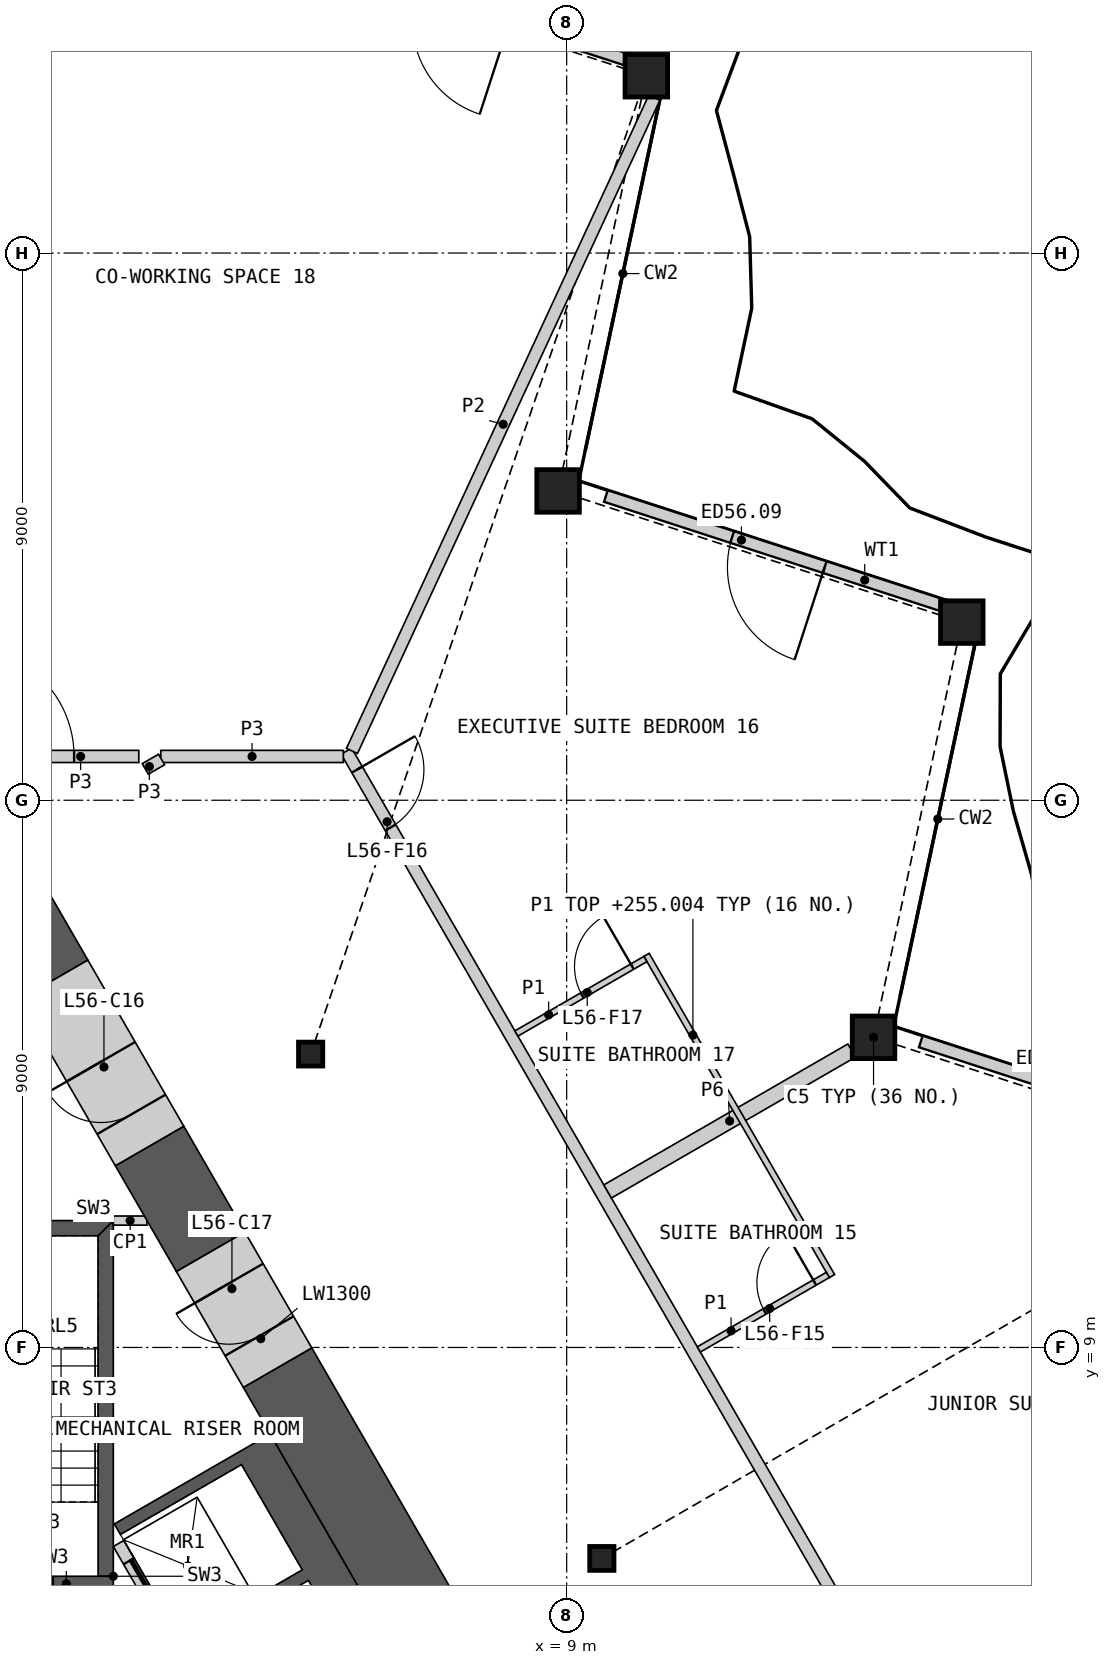
"""IFC4 building model, lengths in metres.
Left out: names, types, materials, properties, quantities, classifications, styles, units other than length and angle.
Written with IfcOpenShell. Run it as: python <this file> out.ifc"""

import sys

from ifc_helpers import new_model, si_unit, direction, frame, frame_2d, origin, origin_2d, place, context, subcontext, project, spatial, polyline, rectangle, hollow_rectangle, i_section, outline, extrude, element, fill, save


model = new_model("IFC4")
c1 = context("Model", 3, precision=1e-05, world=origin(), true_north=direction((0.0, 1.0)))
c2 = subcontext(c1, "Body", "Model", "MODEL_VIEW")
j1 = project(units=[si_unit("LENGTHUNIT", "METRE"), si_unit("PLANEANGLEUNIT", "RADIAN")], contexts=[c1])
p1 = place(None, origin())
s1 = spatial("IfcSite", under=j1, at=p1, CompositionType="ELEMENT")
p2 = place(p1, origin())
s2 = spatial("IfcBuilding", under=s1, at=p2, CompositionType="ELEMENT")
p3 = place(p2, frame((0.0, 0.0, 252.6)))
s3 = spatial("IfcBuildingStorey", under=s2, at=p3, CompositionType="ELEMENT", Elevation=252.6)
for number, where, z_axis, x_axis in (
    (1, (14.047, 14.101, 0.0), (0.0, 0.0, 1.0), (1.0, 0.0, 0.0)),
    (2, (15.499, 20.93, 0.0), (0.0, 0.0, 1.0), (1.0, 0.0, 0.0)),
    (3, (8.859, 23.087, 0.0), (0.0, 0.0, 1.0), (1.0, 0.0, 0.0)),
    (4, (10.31, 29.916, 0.0), (0.0, 0.0, 1.0), (1.0, 0.0, 0.0)),
):
    element("IfcColumn", number, at=place(p3, frame(where, z_axis=z_axis, x_axis=x_axis)), inside=s3, PredefinedType="COLUMN", context=c2, shape_type="SweptSolid", body=[
        extrude(hollow_rectangle(XDim=0.7, YDim=0.7, WallThickness=0.045, at=origin_2d()), origin(), (0.0, 0.0, 1.0), 3.6),
    ])
for number, where, z_axis, x_axis in (
    (5, (9.578, 5.53, 0.0), (0.0, 0.0, 1.0), (1.0, 0.0, 0.0)),
    (6, (4.789, 13.825, 0.0), (0.0, 0.0, 1.0), (1.0, 0.0, 0.0)),
):
    element("IfcColumn", number, at=place(p3, frame(where, z_axis=z_axis, x_axis=x_axis)), inside=s3, PredefinedType="COLUMN", context=c2, shape_type="SweptSolid", body=[
        extrude(i_section(OverallWidth=0.399, OverallDepth=0.393, WebThickness=0.023, FlangeThickness=0.037, at=origin_2d()), origin(), (0.0, 0.0, 1.0), 3.6),
    ])
p4 = place(p3, frame((20.5, 12.188, 0.0), z_axis=(0.0, 0.0, 1.0), x_axis=(-0.951053307318, 0.309026870418, 0.0)))
e7 = element("IfcWall", 7, at=p4, inside=s3, PredefinedType="SOLIDWALL", context=c2, shape_type="SweptSolid", body=[
    extrude(rectangle(XDim=5.968, YDim=0.2, at=frame_2d((2.984, 0.0))), origin(), (0.0, 0.0, 1.0), 2.701),
])
p5 = place(p4, frame((2.184, 0.0, 0.0)))
e8 = element("IfcOpeningElement", 8, at=p5, cuts=e7, PredefinedType="OPENING", context=c2, shape_type="SweptSolid", body=[
    extrude(rectangle(XDim=1.6, YDim=2.4, at=frame_2d((0.8, 1.2))), frame((0.0, 0.11, 0.0), z_axis=(0.0, -1.0, 0.0), x_axis=(1.0, 0.0, 0.0)), (0.0, 0.0, 1.0), 0.22),
])
p6 = place(p3, frame((15.321, 21.159, 0.0), z_axis=(0.0, 0.0, 1.0), x_axis=(-0.951053307318, 0.309026870418, 0.0)))
e9 = element("IfcWall", 9, at=p6, inside=s3, PredefinedType="SOLIDWALL", context=c2, shape_type="SweptSolid", body=[
    extrude(rectangle(XDim=5.968, YDim=0.2, at=frame_2d((2.984, 0.0))), origin(), (0.0, 0.0, 1.0), 2.701),
])
p7 = place(p6, frame((2.184, 0.0, 0.0)))
e10 = element("IfcOpeningElement", 10, at=p7, cuts=e9, PredefinedType="OPENING", context=c2, shape_type="SweptSolid", body=[
    extrude(rectangle(XDim=1.6, YDim=2.4, at=frame_2d((0.8, 1.2))), frame((0.0, 0.11, 0.0), z_axis=(0.0, -1.0, 0.0), x_axis=(1.0, 0.0, 0.0)), (0.0, 0.0, 1.0), 0.22),
])
p8 = place(p3, frame((10.141, 30.131, 0.0), z_axis=(0.0, 0.0, 1.0), x_axis=(-0.951049400374, 0.309038894069, 0.0)))
e11 = element("IfcWall", 11, at=p8, inside=s3, PredefinedType="SOLIDWALL", context=c2, shape_type="SweptSolid", body=[
    extrude(rectangle(XDim=5.968, YDim=0.2, at=frame_2d((2.984, 0.0))), origin(), (0.0, 0.0, 1.0), 2.701),
])
p9 = place(p8, frame((2.184, 0.0, 0.0)))
e12 = element("IfcOpeningElement", 12, at=p9, cuts=e11, PredefinedType="OPENING", context=c2, shape_type="SweptSolid", body=[
    extrude(rectangle(XDim=1.6, YDim=2.4, at=frame_2d((0.8, 1.2))), frame((0.0, 0.11, 0.0), z_axis=(0.0, -1.0, 0.0), x_axis=(1.0, 0.0, 0.0)), (0.0, 0.0, 1.0), 0.22),
])
p10 = place(p3, origin())
e13 = element("IfcWall", 13, at=p10, inside=s3, PredefinedType="SHEAR", context=c2, shape_type="SweptSolid", body=[
    extrude(outline(polyline([(7.524, 1.688), (7.131, 1.461), (4.96, 0.208), (4.861, 0.381), (6.852, 1.531), (4.752, 5.169), (2.76, 4.019), (2.66, 4.192), (4.652, 5.342), (3.652, 7.074), (1.66, 5.924), (1.561, 6.097), (3.731, 7.35), (4.124, 7.577), (7.524, 1.688)])), origin(), (0.0, 0.0, 1.0), 3.25),
])
p11 = place(p3, frame((5.817, -1.476, 0.0), z_axis=(0.0, 0.0, 1.0), x_axis=(-0.500002616675, 0.866023893041, 0.0)))
e14 = element("IfcWall", 14, at=p11, inside=s3, PredefinedType="SOLIDWALL", context=c2, shape_type="SweptSolid", body=[
    extrude(rectangle(XDim=8.373, YDim=0.2, at=frame_2d((4.187, 0.0))), origin(), (0.0, 0.0, 1.0), 3.25),
])
p12 = place(p11, frame((0.437, 0.0, 0.0)))
e15 = element("IfcOpeningElement", 15, at=p12, cuts=e14, PredefinedType="OPENING", context=c2, shape_type="SweptSolid", body=[
    extrude(rectangle(XDim=0.9, YDim=2.1, at=frame_2d((0.45, 1.05))), frame((0.0, 0.11, 0.0), z_axis=(0.0, -1.0, 0.0), x_axis=(1.0, 0.0, 0.0)), (0.0, 0.0, 1.0), 0.22),
])
p13 = place(p11, frame((3.737, 0.0, 0.0)))
e16 = element("IfcOpeningElement", 16, at=p13, cuts=e14, PredefinedType="OPENING", context=c2, shape_type="SweptSolid", body=[
    extrude(rectangle(XDim=0.9, YDim=2.1, at=frame_2d((0.45, 1.05))), frame((0.0, 0.11, 0.0), z_axis=(0.0, -1.0, 0.0), x_axis=(1.0, 0.0, 0.0)), (0.0, 0.0, 1.0), 0.22),
])
p14 = place(p11, frame((6.937, 0.0, 0.0)))
e17 = element("IfcOpeningElement", 17, at=p14, cuts=e14, PredefinedType="OPENING", context=c2, shape_type="SweptSolid", body=[
    extrude(rectangle(XDim=1.1, YDim=2.1, at=frame_2d((0.55, 1.05))), frame((0.0, 0.11, 0.0), z_axis=(0.0, -1.0, 0.0), x_axis=(1.0, 0.0, 0.0)), (0.0, 0.0, 1.0), 0.22),
])
p15 = place(p3, origin())
e18 = element("IfcWall", 18, at=p15, inside=s3, PredefinedType="SHEAR", context=c2, shape_type="SweptSolid", body=[
    extrude(outline(polyline([(1.544, 5.237), (1.544, 11.087), (1.294, 10.837), (1.294, 5.237), (1.544, 5.237)])), origin(), (0.0, 0.0, 1.0), 3.25),
])
p16 = place(p3, origin())
e19 = element("IfcWall", 19, at=p16, inside=s3, PredefinedType="SHEAR", context=c2, shape_type="SweptSolid", body=[
    extrude(outline(polyline([(1.544, 11.087), (-1.544, 11.087), (-1.294, 10.837), (1.294, 10.837), (1.544, 11.087)])), origin(), (0.0, 0.0, 1.0), 3.25),
])
p17 = place(p3, frame((1.544, 5.112, 0.0), z_axis=(0.0, 0.0, 1.0), x_axis=(-1.0, 0.0, 0.0)))
e20 = element("IfcWall", 20, at=p17, inside=s3, PredefinedType="SHEAR", context=c2, shape_type="SweptSolid", body=[
    extrude(rectangle(XDim=3.088, YDim=0.25, at=frame_2d((1.544, 0.0))), origin(), (0.0, 0.0, 1.0), 3.25),
])
p18 = place(p17, frame((0.994, 0.0, 0.0)))
e21 = element("IfcOpeningElement", 21, at=p18, cuts=e20, PredefinedType="OPENING", context=c2, shape_type="SweptSolid", body=[
    extrude(rectangle(XDim=1.1, YDim=2.1, at=frame_2d((0.55, 1.05))), frame((0.0, 0.135, 0.0), z_axis=(0.0, -1.0, 0.0), x_axis=(1.0, 0.0, 0.0)), (0.0, 0.0, 1.0), 0.27),
])
p19 = place(p3, frame((1.544, 11.087, 0.0), z_axis=(0.0, 0.0, 1.0), x_axis=(1.0, 0.0, 0.0)))
e22 = element("IfcWall", 22, at=p19, inside=s3, PredefinedType="PARTITIONING", context=c2, shape_type="SweptSolid", body=[
    extrude(rectangle(XDim=0.554, YDim=0.15, at=frame_2d((0.277, 0.0))), origin(), (0.0, 0.0, 1.0), 3.25),
])
p20 = place(p3, frame((10.081, -1.441, 0.0), z_axis=(0.0, 0.0, 1.0), x_axis=(-0.500006109471, 0.866021876451, 0.0)))
e23 = element("IfcWall", 23, at=p20, inside=s3, PredefinedType="SHEAR", context=c2, shape_type="SweptSolid", body=[
    extrude(rectangle(XDim=11.672, YDim=1.3, at=frame_2d((5.836, 0.0))), origin(), (0.0, 0.0, 1.0), 3.25),
])
p21 = place(p3, frame((3.145, 10.573, 0.0), z_axis=(0.0, 0.0, 1.0), x_axis=(-0.500006371327, 0.866021725266, 0.0)))
e24 = element("IfcWall", 24, at=p21, inside=s3, PredefinedType="SHEAR", context=c2, shape_type="SweptSolid", body=[
    extrude(rectangle(XDim=2.01, YDim=1.3, at=frame_2d((1.005, 0.0))), origin(), (0.0, 0.0, 1.0), 3.25),
])
p22 = place(p3, origin())
e25 = element("IfcWall", 25, at=p22, inside=s3, PredefinedType="SHEAR", context=c2, shape_type="SweptSolid", body=[
    extrude(outline(polyline([(-1.126, 15.371), (0.0, 17.321), (1.126, 15.371), (0.0, 14.72), (-1.126, 15.371)])), origin(), (0.0, 0.0, 1.0), 3.25),
])
p23 = place(p3, frame((2.14, 12.313, 0.0), z_axis=(0.0, 0.0, 1.0), x_axis=(-0.499968102766, 0.866043818878, 0.0)))
e26 = element("IfcWall", 26, at=p23, inside=s3, PredefinedType="SHEAR", context=c2, shape_type="SweptSolid", body=[
    extrude(rectangle(XDim=3.155, YDim=1.3, at=frame_2d((1.577, 0.0))), origin(), (0.0, 0.0, 1.0), 3.25),
])
p24 = place(p23, frame((0.6, 0.0, 0.0)))
e27 = element("IfcOpeningElement", 27, at=p24, cuts=e26, PredefinedType="OPENING", context=c2, shape_type="SweptSolid", body=[
    extrude(rectangle(XDim=1.0, YDim=2.1, at=frame_2d((0.5, 1.05))), frame((0.0, 0.66, 0.0), z_axis=(0.0, -1.0, 0.0), x_axis=(1.0, 0.0, 0.0)), (0.0, 0.0, 1.0), 1.32),
])
p25 = place(p3, frame((4.245, 8.668, 0.0), z_axis=(0.0, 0.0, 1.0), x_axis=(-0.50002983664, 0.866008176907, 0.0)))
e28 = element("IfcWall", 28, at=p25, inside=s3, PredefinedType="SHEAR", context=c2, shape_type="SweptSolid", body=[
    extrude(rectangle(XDim=2.2, YDim=1.3, at=frame_2d((1.1, 0.0))), origin(), (0.0, 0.0, 1.0), 3.25),
])
p26 = place(p25, frame((0.6, 0.0, 0.0)))
e29 = element("IfcOpeningElement", 29, at=p26, cuts=e28, PredefinedType="OPENING", context=c2, shape_type="SweptSolid", body=[
    extrude(rectangle(XDim=1.0, YDim=2.1, at=frame_2d((0.5, 1.05))), frame((0.0, 0.66, 0.0), z_axis=(0.0, -1.0, 0.0), x_axis=(1.0, 0.0, 0.0)), (0.0, 0.0, 1.0), 1.32),
])
p27 = place(p3, frame((5.377, 18.807, 0.0), z_axis=(0.0, 0.0, 1.0), x_axis=(0.499999852422, -0.866025488988, 0.0)))
e30 = element("IfcWall", 30, at=p27, inside=s3, PredefinedType="PARTITIONING", context=c2, shape_type="SweptSolid", body=[
    extrude(rectangle(XDim=27.198, YDim=0.2, at=frame_2d((13.599, 0.0))), origin(), (0.0, 0.0, 1.0), 3.25),
])
p28 = place(p27, frame((25.096, 0.0, 0.0)))
e31 = element("IfcOpeningElement", 31, at=p28, cuts=e30, PredefinedType="OPENING", context=c2, shape_type="SweptSolid", body=[
    extrude(rectangle(XDim=0.95, YDim=2.1, at=frame_2d((0.475, 1.05))), frame((0.0, 0.11, 0.0), z_axis=(0.0, -1.0, 0.0), x_axis=(1.0, 0.0, 0.0)), (0.0, 0.0, 1.0), 0.22),
])
p29 = place(p27, frame((19.122, 0.0, 0.0)))
e32 = element("IfcOpeningElement", 32, at=p29, cuts=e30, PredefinedType="OPENING", context=c2, shape_type="SweptSolid", body=[
    extrude(rectangle(XDim=1.0, YDim=2.1, at=frame_2d((0.5, 1.05))), frame((0.0, 0.11, 0.0), z_axis=(0.0, -1.0, 0.0), x_axis=(1.0, 0.0, 0.0)), (0.0, 0.0, 1.0), 0.22),
])
p30 = place(p27, frame((17.115, 0.0, 0.0)))
e33 = element("IfcOpeningElement", 33, at=p30, cuts=e30, PredefinedType="OPENING", context=c2, shape_type="SweptSolid", body=[
    extrude(rectangle(XDim=1.1, YDim=2.1, at=frame_2d((0.55, 1.05))), frame((0.0, 0.11, 0.0), z_axis=(0.0, -1.0, 0.0), x_axis=(1.0, 0.0, 0.0)), (0.0, 0.0, 1.0), 0.22),
])
p31 = place(p27, frame((0.35, 0.0, 0.0)))
e34 = element("IfcOpeningElement", 34, at=p31, cuts=e30, PredefinedType="OPENING", context=c2, shape_type="SweptSolid", body=[
    extrude(rectangle(XDim=1.1, YDim=2.1, at=frame_2d((0.55, 1.05))), frame((0.0, 0.11, 0.0), z_axis=(0.0, -1.0, 0.0), x_axis=(1.0, 0.0, 0.0)), (0.0, 0.0, 1.0), 0.22),
])
p32 = place(p3, frame((9.673, 11.566, 0.0), z_axis=(0.0, 0.0, 1.0), x_axis=(0.866039966287, 0.499974776157, 0.0)))
e35 = element("IfcWall", 35, at=p32, inside=s3, PredefinedType="PARTITIONING", context=c2, shape_type="SweptSolid", body=[
    extrude(rectangle(XDim=4.635, YDim=0.25, at=frame_2d((2.317, 0.0))), origin(), (0.0, 0.0, 1.0), 2.404),
])
p33 = place(p3, frame((-1.863, 18.72, 0.0), z_axis=(0.0, 0.0, 1.0), x_axis=(1.0, 0.0, 0.0)))
e36 = element("IfcWall", 36, at=p33, inside=s3, PredefinedType="PARTITIONING", context=c2, shape_type="SweptSolid", body=[
    extrude(rectangle(XDim=3.826, YDim=0.2, at=frame_2d((1.913, 0.0))), origin(), (0.0, 0.0, 1.0), 3.25),
])
p34 = place(p33, frame((0.962, 0.0, 0.0)))
e37 = element("IfcOpeningElement", 37, at=p34, cuts=e36, PredefinedType="OPENING", context=c2, shape_type="SweptSolid", body=[
    extrude(rectangle(XDim=1.8, YDim=2.1, at=frame_2d((0.9, 1.05))), frame((0.0, 0.11, 0.0), z_axis=(0.0, -1.0, 0.0), x_axis=(1.0, 0.0, 0.0)), (0.0, 0.0, 1.0), 0.22),
])
p35 = place(p3, frame((2.325, 18.72, 0.0), z_axis=(0.0, 0.0, 1.0), x_axis=(1.0, 0.0, 0.0)))
e38 = element("IfcWall", 38, at=p35, inside=s3, PredefinedType="PARTITIONING", context=c2, shape_type="SweptSolid", body=[
    extrude(rectangle(XDim=3.002, YDim=0.2, at=frame_2d((1.501, 0.0))), origin(), (0.0, 0.0, 1.0), 3.25),
])
p36 = place(p3, frame((2.07, 18.515, 0.0), z_axis=(0.0, 0.0, 1.0), x_axis=(0.866054481515, 0.499949632511, 0.0)))
e39 = element("IfcWall", 39, at=p36, inside=s3, PredefinedType="PARTITIONING", context=c2, shape_type="SweptSolid", body=[
    extrude(rectangle(XDim=0.31, YDim=0.2, at=frame_2d((0.155, 0.0))), origin(), (0.0, 0.0, 1.0), 3.25),
])
p37 = place(p3, frame((5.469, 18.811, 0.0), z_axis=(0.0, 0.0, 1.0), x_axis=(0.419996836618, 0.907525568362, 0.0)))
e40 = element("IfcWall", 40, at=p37, inside=s3, PredefinedType="PARTITIONING", context=c2, shape_type="SweptSolid", body=[
    extrude(rectangle(XDim=11.84, YDim=0.2, at=frame_2d((5.92, 0.0))), origin(), (0.0, 0.0, 1.0), 2.404),
])
p38 = place(p3, frame((10.313, 15.457, 0.0), z_axis=(0.0, 0.0, 1.0), x_axis=(0.499978833458, -0.866037623948, 0.0)))
e41 = element("IfcWall", 41, at=p38, inside=s3, PredefinedType="PARTITIONING", context=c2, shape_type="SweptSolid", body=[
    extrude(rectangle(XDim=6.1, YDim=0.1, at=frame_2d((3.05, 0.0))), origin(), (0.0, 0.0, 1.0), 2.404),
])
p39 = place(p3, frame((11.173, 8.968, 0.0), z_axis=(0.0, 0.0, 1.0), x_axis=(0.866014668023, 0.500018594424, 0.0)))
e42 = element("IfcWall", 42, at=p39, inside=s3, PredefinedType="PARTITIONING", context=c2, shape_type="SweptSolid", body=[
    extrude(rectangle(XDim=2.45, YDim=0.1, at=frame_2d((1.225, 0.0))), origin(), (0.0, 0.0, 1.0), 2.404),
])
p40 = place(p39, frame((1.25, 0.0, 0.0)))
e43 = element("IfcOpeningElement", 43, at=p40, cuts=e42, PredefinedType="OPENING", context=c2, shape_type="SweptSolid", body=[
    extrude(rectangle(XDim=0.95, YDim=2.1, at=frame_2d((0.475, 1.05))), frame((0.0, 0.06, 0.0), z_axis=(0.0, -1.0, 0.0), x_axis=(1.0, 0.0, 0.0)), (0.0, 0.0, 1.0), 0.12),
])
p41 = place(p3, frame((8.173, 14.164, 0.0), z_axis=(0.0, 0.0, 1.0), x_axis=(0.866014668023, 0.500018594424, 0.0)))
e44 = element("IfcWall", 44, at=p41, inside=s3, PredefinedType="PARTITIONING", context=c2, shape_type="SweptSolid", body=[
    extrude(rectangle(XDim=2.45, YDim=0.1, at=frame_2d((1.225, 0.0))), origin(), (0.0, 0.0, 1.0), 2.404),
])
p42 = place(p41, frame((1.25, 0.0, 0.0)))
e45 = element("IfcOpeningElement", 45, at=p42, cuts=e44, PredefinedType="OPENING", context=c2, shape_type="SweptSolid", body=[
    extrude(rectangle(XDim=0.95, YDim=2.1, at=frame_2d((0.475, 1.05))), frame((0.0, 0.06, 0.0), z_axis=(0.0, -1.0, 0.0), x_axis=(1.0, 0.0, 0.0)), (0.0, 0.0, 1.0), 0.12),
])
p43 = place(p7, origin())
e46 = element("IfcDoor", 46, at=p43, inside=s3, OperationType="DOUBLE_DOOR_SINGLE_SWING", PredefinedType="DOOR", context=c2, shape_type="SweptSolid", body=[
    extrude(rectangle(XDim=1.6, YDim=2.4, at=frame_2d((0.8, 1.2))), frame((0.0, 0.025, 0.0), z_axis=(0.0, -1.0, 0.0), x_axis=(1.0, 0.0, 0.0)), (0.0, 0.0, 1.0), 0.05),
])
fill(e10, e46)
p44 = place(p14, origin())
e47 = element("IfcDoor", 47, at=p44, inside=s3, OperationType="SLIDING_TO_LEFT", PredefinedType="DOOR", context=c2, shape_type="SweptSolid", body=[
    extrude(rectangle(XDim=1.1, YDim=2.1, at=frame_2d((0.55, 1.05))), frame((0.0, 0.025, 0.0), z_axis=(0.0, -1.0, 0.0), x_axis=(1.0, 0.0, 0.0)), (0.0, 0.0, 1.0), 0.05),
])
fill(e17, e47)
p45 = place(p18, origin())
e48 = element("IfcDoor", 48, at=p45, inside=s3, OperationType="SINGLE_SWING_LEFT", PredefinedType="DOOR", context=c2, shape_type="SweptSolid", body=[
    extrude(rectangle(XDim=1.1, YDim=2.1, at=frame_2d((0.55, 1.05))), frame((0.0, 0.025, 0.0), z_axis=(0.0, -1.0, 0.0), x_axis=(1.0, 0.0, 0.0)), (0.0, 0.0, 1.0), 0.05),
])
fill(e21, e48)
p46 = place(p24, origin())
e49 = element("IfcDoor", 49, at=p46, inside=s3, OperationType="SINGLE_SWING_RIGHT", PredefinedType="DOOR", context=c2, shape_type="SweptSolid", body=[
    extrude(rectangle(XDim=1.0, YDim=2.1, at=frame_2d((0.5, 1.05))), frame((0.0, 0.405, 0.0), z_axis=(0.0, -1.0, 0.0), x_axis=(1.0, 0.0, 0.0)), (0.0, 0.0, 1.0), 0.05),
])
fill(e27, e49)
p47 = place(p26, origin())
e50 = element("IfcDoor", 50, at=p47, inside=s3, OperationType="SINGLE_SWING_RIGHT", PredefinedType="DOOR", context=c2, shape_type="SweptSolid", body=[
    extrude(rectangle(XDim=1.0, YDim=2.1, at=frame_2d((0.5, 1.05))), frame((0.0, 0.405, 0.0), z_axis=(0.0, -1.0, 0.0), x_axis=(1.0, 0.0, 0.0)), (0.0, 0.0, 1.0), 0.05),
])
fill(e29, e50)
p48 = place(p40, origin())
e51 = element("IfcDoor", 51, at=p48, inside=s3, OperationType="SINGLE_SWING_RIGHT", PredefinedType="DOOR", context=c2, shape_type="SweptSolid", body=[
    extrude(rectangle(XDim=0.95, YDim=2.1, at=frame_2d((0.475, 1.05))), frame((0.0, 0.025, 0.0), z_axis=(0.0, -1.0, 0.0), x_axis=(1.0, 0.0, 0.0)), (0.0, 0.0, 1.0), 0.05),
])
fill(e43, e51)
p49 = place(p31, origin())
e52 = element("IfcDoor", 52, at=p49, inside=s3, OperationType="SINGLE_SWING_LEFT", PredefinedType="DOOR", context=c2, shape_type="SweptSolid", body=[
    extrude(rectangle(XDim=1.1, YDim=2.1, at=frame_2d((0.55, 1.05))), frame((0.0, 0.025, 0.0), z_axis=(0.0, -1.0, 0.0), x_axis=(1.0, 0.0, 0.0)), (0.0, 0.0, 1.0), 0.05),
])
fill(e34, e52)
p50 = place(p42, origin())
e53 = element("IfcDoor", 53, at=p50, inside=s3, OperationType="SINGLE_SWING_RIGHT", PredefinedType="DOOR", context=c2, shape_type="SweptSolid", body=[
    extrude(rectangle(XDim=0.95, YDim=2.1, at=frame_2d((0.475, 1.05))), frame((0.0, 0.025, 0.0), z_axis=(0.0, -1.0, 0.0), x_axis=(1.0, 0.0, 0.0)), (0.0, 0.0, 1.0), 0.05),
])
fill(e45, e53)
p51 = place(p34, origin())
e54 = element("IfcDoor", 54, at=p51, inside=s3, OperationType="DOUBLE_DOOR_SINGLE_SWING", PredefinedType="DOOR", context=c2, shape_type="SweptSolid", body=[
    extrude(rectangle(XDim=1.8, YDim=2.1, at=frame_2d((0.9, 1.05))), frame((0.0, 0.025, 0.0), z_axis=(0.0, -1.0, 0.0), x_axis=(1.0, 0.0, 0.0)), (0.0, 0.0, 1.0), 0.05),
])
fill(e37, e54)
save(model, sys.argv[1])
